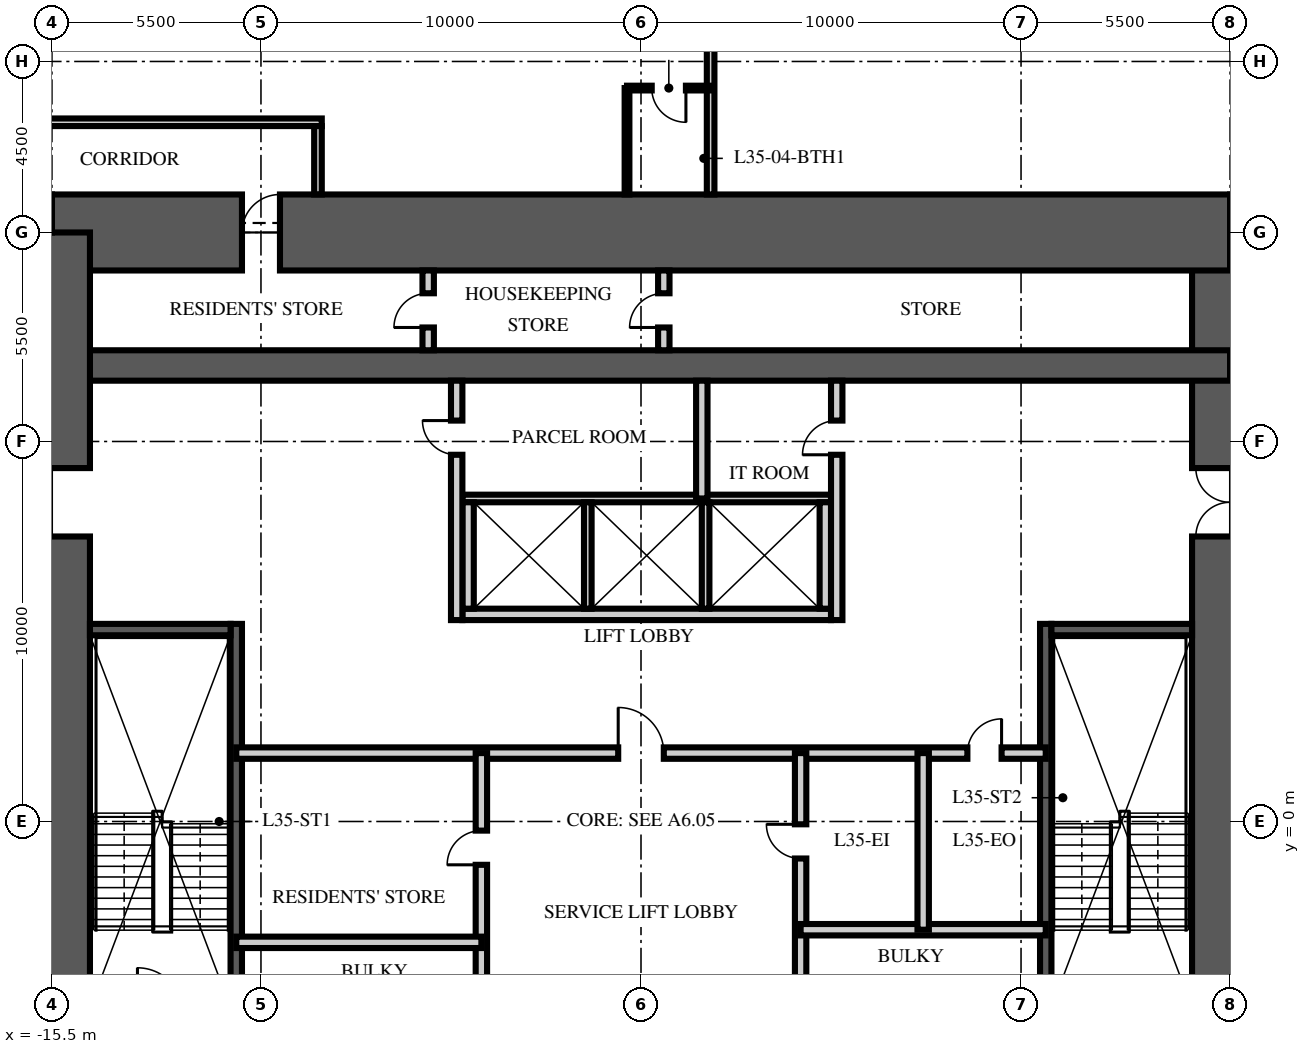
"""IFC4 building model, lengths in metres.
Left out: names, types, materials, properties, quantities, classifications, styles, units other than length and angle.
Written with IfcOpenShell. Run it as: python <this file> out.ifc"""

import sys

from ifc_helpers import new_model, si_unit, direction, frame, frame_2d, origin, place, context, subcontext, project, spatial, rectangle, extrude, element, fill, save


model = new_model("IFC4")
c1 = context("Model", 3, precision=1e-05, world=origin(), true_north=direction((0.0, 1.0)))
c2 = subcontext(c1, "Body", "Model", "MODEL_VIEW")
j1 = project(units=[si_unit("LENGTHUNIT", "METRE"), si_unit("PLANEANGLEUNIT", "RADIAN")], contexts=[c1])
p1 = place(None, origin())
s1 = spatial("IfcSite", under=j1, at=p1, CompositionType="ELEMENT")
p2 = place(p1, origin())
s2 = spatial("IfcBuilding", under=s1, at=p2, CompositionType="ELEMENT")
p3 = place(p2, frame((0.0, 0.0, 141.0)))
s3 = spatial("IfcBuildingStorey", under=s2, at=p3, CompositionType="ELEMENT", Elevation=141.0)
p4 = place(p3, frame((15.5, -15.5, -0.25), z_axis=(0.0, 0.0, 1.0), x_axis=(0.0, 1.0, 0.0)))
e1 = element("IfcWall", 1, at=p4, inside=s3, PredefinedType="SHEAR", context=c2, shape_type="SweptSolid", body=[
    extrude(rectangle(XDim=31.0, YDim=2.0, at=frame_2d((15.5, 0.0))), origin(), (0.0, 0.0, 1.0), 3.75),
])
p5 = place(p4, frame((6.5, 0.0, 0.25)))
e2 = element("IfcOpeningElement", 2, at=p5, cuts=e1, PredefinedType="OPENING", context=c2, shape_type="SweptSolid", body=[
    extrude(rectangle(XDim=1.2, YDim=2.1, at=frame_2d((0.6, 1.05))), frame((0.0, 1.01, 0.0), z_axis=(0.0, -1.0, 0.0), x_axis=(1.0, 0.0, 0.0)), (0.0, 0.0, 1.0), 2.02),
])
p6 = place(p4, frame((23.0, 0.0, 0.25)))
e3 = element("IfcOpeningElement", 3, at=p6, cuts=e1, PredefinedType="OPENING", context=c2, shape_type="SweptSolid", body=[
    extrude(rectangle(XDim=1.8, YDim=2.1, at=frame_2d((0.9, 1.05))), frame((0.0, 1.01, 0.0), z_axis=(0.0, -1.0, 0.0), x_axis=(1.0, 0.0, 0.0)), (0.0, 0.0, 1.0), 2.02),
])
p7 = place(p3, frame((-15.5, 15.5, -0.25), z_axis=(0.0, 0.0, 1.0), x_axis=(1.0, 0.0, 0.0)))
e4 = element("IfcWall", 4, at=p7, inside=s3, PredefinedType="SHEAR", context=c2, shape_type="SweptSolid", body=[
    extrude(rectangle(XDim=31.0, YDim=2.0, at=frame_2d((15.5, 0.0))), origin(), (0.0, 0.0, 1.0), 3.75),
])
p8 = place(p7, frame((5.0, 0.0, 0.25)))
e5 = element("IfcOpeningElement", 5, at=p8, cuts=e4, PredefinedType="OPENING", context=c2, shape_type="SweptSolid", body=[
    extrude(rectangle(XDim=1.0, YDim=2.1, at=frame_2d((0.5, 1.05))), frame((0.0, 1.01, 0.0), z_axis=(0.0, -1.0, 0.0), x_axis=(1.0, 0.0, 0.0)), (0.0, 0.0, 1.0), 2.02),
])
p9 = place(p3, frame((-15.5, 12.0, -0.25), z_axis=(0.0, 0.0, 1.0), x_axis=(1.0, 0.0, 0.0)))
e6 = element("IfcWall", 6, at=p9, inside=s3, PredefinedType="SHEAR", context=c2, shape_type="SweptSolid", body=[
    extrude(rectangle(XDim=31.0, YDim=0.8, at=frame_2d((15.5, 0.0))), origin(), (0.0, 0.0, 1.0), 3.75),
])
p10 = place(p3, frame((-15.5, -15.5, -0.25), z_axis=(0.0, 0.0, 1.0), x_axis=(0.0, 1.0, 0.0)))
e7 = element("IfcWall", 7, at=p10, inside=s3, PredefinedType="SHEAR", context=c2, shape_type="SweptSolid", body=[
    extrude(rectangle(XDim=31.0, YDim=2.0, at=frame_2d((15.5, 0.0))), origin(), (0.0, 0.0, 1.0), 3.75),
])
p11 = place(p10, frame((6.5, 0.0, 0.25)))
e8 = element("IfcOpeningElement", 8, at=p11, cuts=e7, PredefinedType="OPENING", context=c2, shape_type="SweptSolid", body=[
    extrude(rectangle(XDim=1.2, YDim=2.1, at=frame_2d((0.6, 1.05))), frame((0.0, 1.01, 0.0), z_axis=(0.0, -1.0, 0.0), x_axis=(1.0, 0.0, 0.0)), (0.0, 0.0, 1.0), 2.02),
])
p12 = place(p10, frame((23.0, 0.0, 0.25)))
e9 = element("IfcOpeningElement", 9, at=p12, cuts=e7, PredefinedType="OPENING", context=c2, shape_type="SweptSolid", body=[
    extrude(rectangle(XDim=1.8, YDim=2.1, at=frame_2d((0.9, 1.05))), frame((0.0, 1.01, 0.0), z_axis=(0.0, -1.0, 0.0), x_axis=(1.0, 0.0, 0.0)), (0.0, 0.0, 1.0), 2.02),
])
p13 = place(p3, frame((-10.65, -4.9, 0.0), z_axis=(0.0, 0.0, 1.0), x_axis=(0.0, 1.0, 0.0)))
e10 = element("IfcWall", 10, at=p13, inside=s3, PredefinedType="SOLIDWALL", context=c2, shape_type="SweptSolid", body=[
    extrude(rectangle(XDim=10.1, YDim=0.3, at=frame_2d((5.05, 0.0))), origin(), (0.0, 0.0, 1.0), 3.5),
])
p14 = place(p3, frame((-14.5, 5.05, 0.0), z_axis=(0.0, 0.0, 1.0), x_axis=(1.0, 0.0, 0.0)))
e11 = element("IfcWall", 11, at=p14, inside=s3, PredefinedType="SOLIDWALL", context=c2, shape_type="SweptSolid", body=[
    extrude(rectangle(XDim=3.7, YDim=0.3, at=frame_2d((1.85, 0.0))), origin(), (0.0, 0.0, 1.0), 3.5),
])
p15 = place(p3, frame((10.65, -4.9, 0.0), z_axis=(0.0, 0.0, 1.0), x_axis=(0.0, 1.0, 0.0)))
e12 = element("IfcWall", 12, at=p15, inside=s3, PredefinedType="SOLIDWALL", context=c2, shape_type="SweptSolid", body=[
    extrude(rectangle(XDim=10.1, YDim=0.3, at=frame_2d((5.05, 0.0))), origin(), (0.0, 0.0, 1.0), 3.5),
])
p16 = place(p3, frame((14.5, 5.05, 0.0), z_axis=(0.0, 0.0, 1.0), x_axis=(-1.0, 0.0, 0.0)))
e13 = element("IfcWall", 13, at=p16, inside=s3, PredefinedType="SOLIDWALL", context=c2, shape_type="SweptSolid", body=[
    extrude(rectangle(XDim=3.7, YDim=0.3, at=frame_2d((1.85, 0.0))), origin(), (0.0, 0.0, 1.0), 3.5),
])
p17 = place(p3, frame((-4.7, 5.45, 0.0), z_axis=(0.0, 0.0, 1.0), x_axis=(1.0, 0.0, 0.0)))
e14 = element("IfcWall", 14, at=p17, inside=s3, PredefinedType="PARTITIONING", context=c2, shape_type="SweptSolid", body=[
    extrude(rectangle(XDim=9.7, YDim=0.3, at=frame_2d((4.85, 0.0))), origin(), (0.0, 0.0, 1.0), 3.5),
])
p18 = place(p3, frame((-4.7, 8.5, 0.0), z_axis=(0.0, 0.0, 1.0), x_axis=(1.0, 0.0, 0.0)))
e15 = element("IfcWall", 15, at=p18, inside=s3, PredefinedType="PARTITIONING", context=c2, shape_type="SweptSolid", body=[
    extrude(rectangle(XDim=9.7, YDim=0.2, at=frame_2d((4.85, 0.0))), origin(), (0.0, 0.0, 1.0), 3.5),
])
for number, where, z_axis, x_axis in (
    (16, (-4.55, 5.6, 0.0), (0.0, 0.0, 1.0), (0.0, 1.0, 0.0)),
    (17, (4.85, 5.6, 0.0), (0.0, 0.0, 1.0), (0.0, 1.0, 0.0)),
):
    element("IfcWall", number, at=place(p3, frame(where, z_axis=z_axis, x_axis=x_axis)), inside=s3, PredefinedType="PARTITIONING", context=c2, shape_type="SweptSolid", body=[
        extrude(rectangle(XDim=2.8, YDim=0.3, at=frame_2d((1.4, 0.0))), origin(), (0.0, 0.0, 1.0), 3.5),
    ])
for number, where, z_axis, x_axis in (
    (18, (-1.4, 5.6, 0.0), (0.0, 0.0, 1.0), (0.0, 1.0, 0.0)),
    (19, (1.7, 5.6, 0.0), (0.0, 0.0, 1.0), (0.0, 1.0, 0.0)),
):
    element("IfcWall", number, at=place(p3, frame(where, z_axis=z_axis, x_axis=x_axis)), inside=s3, PredefinedType="PARTITIONING", context=c2, shape_type="SweptSolid", body=[
        extrude(rectangle(XDim=2.8, YDim=0.2, at=frame_2d((1.4, 0.0))), origin(), (0.0, 0.0, 1.0), 3.5),
    ])
p19 = place(p3, frame((-10.65, 1.8, 0.0), z_axis=(0.0, 0.0, 1.0), x_axis=(1.0, 0.0, 0.0)))
e20 = element("IfcWall", 20, at=p19, inside=s3, PredefinedType="PARTITIONING", context=c2, shape_type="SweptSolid", body=[
    extrude(rectangle(XDim=21.3, YDim=0.3, at=frame_2d((10.65, 0.0))), origin(), (0.0, 0.0, 1.0), 3.5),
])
p20 = place(p19, frame((10.05, 0.0, 0.0)))
e21 = element("IfcOpeningElement", 21, at=p20, cuts=e20, PredefinedType="OPENING", context=c2, shape_type="SweptSolid", body=[
    extrude(rectangle(XDim=1.2, YDim=2.1, at=frame_2d((0.6, 1.05))), frame((0.0, 0.16, 0.0), z_axis=(0.0, -1.0, 0.0), x_axis=(1.0, 0.0, 0.0)), (0.0, 0.0, 1.0), 0.32),
])
p21 = place(p19, frame((19.238, 0.0, 0.0)))
e22 = element("IfcOpeningElement", 22, at=p21, cuts=e20, PredefinedType="OPENING", context=c2, shape_type="SweptSolid", body=[
    extrude(rectangle(XDim=0.9, YDim=2.1, at=frame_2d((0.45, 1.05))), frame((0.0, 0.16, 0.0), z_axis=(0.0, -1.0, 0.0), x_axis=(1.0, 0.0, 0.0)), (0.0, 0.0, 1.0), 0.32),
])
p22 = place(p3, frame((-4.2, -6.65, 0.0), z_axis=(0.0, 0.0, 1.0), x_axis=(0.0, 1.0, 0.0)))
e23 = element("IfcWall", 23, at=p22, inside=s3, PredefinedType="PARTITIONING", context=c2, shape_type="SweptSolid", body=[
    extrude(rectangle(XDim=8.45, YDim=0.3, at=frame_2d((4.225, 0.0))), origin(), (0.0, 0.0, 1.0), 3.5),
])
p23 = place(p22, frame((1.285, 0.0, 0.0)))
e24 = element("IfcOpeningElement", 24, at=p23, cuts=e23, PredefinedType="OPENING", context=c2, shape_type="SweptSolid", body=[
    extrude(rectangle(XDim=0.9, YDim=2.1, at=frame_2d((0.45, 1.05))), frame((0.0, 0.16, 0.0), z_axis=(0.0, -1.0, 0.0), x_axis=(1.0, 0.0, 0.0)), (0.0, 0.0, 1.0), 0.32),
])
p24 = place(p22, frame((5.51, 0.0, 0.0)))
e25 = element("IfcOpeningElement", 25, at=p24, cuts=e23, PredefinedType="OPENING", context=c2, shape_type="SweptSolid", body=[
    extrude(rectangle(XDim=0.9, YDim=2.1, at=frame_2d((0.45, 1.05))), frame((0.0, 0.16, 0.0), z_axis=(0.0, -1.0, 0.0), x_axis=(1.0, 0.0, 0.0)), (0.0, 0.0, 1.0), 0.32),
])
p25 = place(p3, frame((4.2, -6.65, 0.0), z_axis=(0.0, 0.0, 1.0), x_axis=(0.0, 1.0, 0.0)))
e26 = element("IfcWall", 26, at=p25, inside=s3, PredefinedType="PARTITIONING", context=c2, shape_type="SweptSolid", body=[
    extrude(rectangle(XDim=8.45, YDim=0.3, at=frame_2d((4.225, 0.0))), origin(), (0.0, 0.0, 1.0), 3.5),
])
p26 = place(p25, frame((1.451, 0.0, 0.0)))
e27 = element("IfcOpeningElement", 27, at=p26, cuts=e26, PredefinedType="OPENING", context=c2, shape_type="SweptSolid", body=[
    extrude(rectangle(XDim=0.9, YDim=2.1, at=frame_2d((0.45, 1.05))), frame((0.0, 0.16, 0.0), z_axis=(0.0, -1.0, 0.0), x_axis=(1.0, 0.0, 0.0)), (0.0, 0.0, 1.0), 0.32),
])
p27 = place(p25, frame((5.676, 0.0, 0.0)))
e28 = element("IfcOpeningElement", 28, at=p27, cuts=e26, PredefinedType="OPENING", context=c2, shape_type="SweptSolid", body=[
    extrude(rectangle(XDim=0.9, YDim=2.1, at=frame_2d((0.45, 1.05))), frame((0.0, 0.16, 0.0), z_axis=(0.0, -1.0, 0.0), x_axis=(1.0, 0.0, 0.0)), (0.0, 0.0, 1.0), 0.32),
])
for number, where, z_axis, x_axis in (
    (29, (-10.65, -3.18, 0.0), (0.0, 0.0, 1.0), (1.0, 0.0, 0.0)),
    (30, (10.65, -2.848, 0.0), (0.0, 0.0, 1.0), (-1.0, 0.0, 0.0)),
):
    element("IfcWall", number, at=place(p3, frame(where, z_axis=z_axis, x_axis=x_axis)), inside=s3, PredefinedType="PARTITIONING", context=c2, shape_type="SweptSolid", body=[
        extrude(rectangle(XDim=6.45, YDim=0.3, at=frame_2d((3.225, 0.0))), origin(), (0.0, 0.0, 1.0), 3.5),
    ])
p28 = place(p3, frame((7.425, -2.848, 0.0), z_axis=(0.0, 0.0, 1.0), x_axis=(0.0, 1.0, 0.0)))
e31 = element("IfcWall", 31, at=p28, inside=s3, PredefinedType="PARTITIONING", context=c2, shape_type="SweptSolid", body=[
    extrude(rectangle(XDim=4.648, YDim=0.3, at=frame_2d((2.324, 0.0))), origin(), (0.0, 0.0, 1.0), 3.5),
])
p29 = place(p3, frame((-4.85, 5.3, 0.0), z_axis=(0.0, 0.0, 1.0), x_axis=(0.0, 1.0, 0.0)))
e32 = element("IfcWall", 32, at=p29, inside=s3, PredefinedType="PARTITIONING", context=c2, shape_type="SweptSolid", body=[
    extrude(rectangle(XDim=6.3, YDim=0.3, at=frame_2d((3.15, 0.0))), origin(), (0.0, 0.0, 1.0), 3.5),
])
p30 = place(p29, frame((4.35, 0.0, 0.0)))
e33 = element("IfcOpeningElement", 33, at=p30, cuts=e32, PredefinedType="OPENING", context=c2, shape_type="SweptSolid", body=[
    extrude(rectangle(XDim=0.9, YDim=2.1, at=frame_2d((0.45, 1.05))), frame((0.0, 0.16, 0.0), z_axis=(0.0, -1.0, 0.0), x_axis=(1.0, 0.0, 0.0)), (0.0, 0.0, 1.0), 0.32),
])
p31 = place(p3, frame((5.15, 5.3, 0.0), z_axis=(0.0, 0.0, 1.0), x_axis=(0.0, 1.0, 0.0)))
e34 = element("IfcWall", 34, at=p31, inside=s3, PredefinedType="PARTITIONING", context=c2, shape_type="SweptSolid", body=[
    extrude(rectangle(XDim=6.3, YDim=0.3, at=frame_2d((3.15, 0.0))), origin(), (0.0, 0.0, 1.0), 3.5),
])
p32 = place(p31, frame((4.35, 0.0, 0.0)))
e35 = element("IfcOpeningElement", 35, at=p32, cuts=e34, PredefinedType="OPENING", context=c2, shape_type="SweptSolid", body=[
    extrude(rectangle(XDim=0.9, YDim=2.1, at=frame_2d((0.45, 1.05))), frame((0.0, 0.16, 0.0), z_axis=(0.0, -1.0, 0.0), x_axis=(1.0, 0.0, 0.0)), (0.0, 0.0, 1.0), 0.32),
])
p33 = place(p3, frame((1.6, 8.5, 0.0), z_axis=(0.0, 0.0, 1.0), x_axis=(0.0, 1.0, 0.0)))
e36 = element("IfcWall", 36, at=p33, inside=s3, PredefinedType="PARTITIONING", context=c2, shape_type="SweptSolid", body=[
    extrude(rectangle(XDim=3.1, YDim=0.3, at=frame_2d((1.55, 0.0))), origin(), (0.0, 0.0, 1.0), 3.5),
])
p34 = place(p3, frame((-5.6, 12.4, 0.0), z_axis=(0.0, 0.0, 1.0), x_axis=(0.0, 1.0, 0.0)))
e37 = element("IfcWall", 37, at=p34, inside=s3, PredefinedType="PARTITIONING", context=c2, shape_type="SweptSolid", body=[
    extrude(rectangle(XDim=2.1, YDim=0.3, at=frame_2d((1.05, 0.0))), origin(), (0.0, 0.0, 1.0), 3.5),
])
p35 = place(p34, frame((0.6, 0.0, 0.0)))
e38 = element("IfcOpeningElement", 38, at=p35, cuts=e37, PredefinedType="OPENING", context=c2, shape_type="SweptSolid", body=[
    extrude(rectangle(XDim=0.9, YDim=2.1, at=frame_2d((0.45, 1.05))), frame((0.0, 0.16, 0.0), z_axis=(0.0, -1.0, 0.0), x_axis=(1.0, 0.0, 0.0)), (0.0, 0.0, 1.0), 0.32),
])
p36 = place(p3, frame((0.6, 12.4, 0.0), z_axis=(0.0, 0.0, 1.0), x_axis=(0.0, 1.0, 0.0)))
e39 = element("IfcWall", 39, at=p36, inside=s3, PredefinedType="PARTITIONING", context=c2, shape_type="SweptSolid", body=[
    extrude(rectangle(XDim=2.1, YDim=0.3, at=frame_2d((1.05, 0.0))), origin(), (0.0, 0.0, 1.0), 3.5),
])
p37 = place(p36, frame((0.6, 0.0, 0.0)))
e40 = element("IfcOpeningElement", 40, at=p37, cuts=e39, PredefinedType="OPENING", context=c2, shape_type="SweptSolid", body=[
    extrude(rectangle(XDim=0.9, YDim=2.1, at=frame_2d((0.45, 1.05))), frame((0.0, 0.16, 0.0), z_axis=(0.0, -1.0, 0.0), x_axis=(1.0, 0.0, 0.0)), (0.0, 0.0, 1.0), 0.32),
])
p38 = place(p3, frame((-18.5, 18.4, 0.0), z_axis=(0.0, 0.0, 1.0), x_axis=(1.0, 0.0, 0.0)))
e41 = element("IfcWall", 41, at=p38, inside=s3, PredefinedType="PARTITIONING", context=c2, shape_type="SweptSolid", body=[
    extrude(rectangle(XDim=10.1, YDim=0.2, at=frame_2d((5.05, 0.0))), origin(), (0.0, 0.0, 1.0), 2.3),
])
p39 = place(p3, frame((-8.5, 18.3, 0.0), z_axis=(0.0, 0.0, 1.0), x_axis=(0.0, -1.0, 0.0)))
e42 = element("IfcWall", 42, at=p39, inside=s3, PredefinedType="PARTITIONING", context=c2, shape_type="SweptSolid", body=[
    extrude(rectangle(XDim=1.8, YDim=0.2, at=frame_2d((0.9, 0.0))), origin(), (0.0, 0.0, 1.0), 3.5),
])
p40 = place(p3, frame((1.832, 16.5, 0.0), z_axis=(0.0, 0.0, 1.0), x_axis=(0.0, 1.0, 0.0)))
e43 = element("IfcWall", 43, at=p40, inside=s3, PredefinedType="PARTITIONING", context=c2, shape_type="SweptSolid", body=[
    extrude(rectangle(XDim=12.15, YDim=0.2, at=frame_2d((6.075, 0.0))), origin(), (0.0, 0.0, 1.0), 2.81),
])
p41 = place(p3, frame((1.832, 19.3, 0.0), z_axis=(0.0, 0.0, 1.0), x_axis=(-1.0, 0.0, 0.0)))
e44 = element("IfcWall", 44, at=p41, inside=s3, PredefinedType="PARTITIONING", context=c2, shape_type="SweptSolid", body=[
    extrude(rectangle(XDim=2.2, YDim=0.125, at=frame_2d((1.1, 0.0))), origin(), (0.0, 0.0, 1.0), 2.7),
])
p42 = place(p41, frame((0.65, 0.0, 0.0)))
e45 = element("IfcOpeningElement", 45, at=p42, cuts=e44, PredefinedType="OPENING", context=c2, shape_type="SweptSolid", body=[
    extrude(rectangle(XDim=0.9, YDim=2.1, at=frame_2d((0.45, 1.05))), frame((0.0, 0.073, 0.0), z_axis=(0.0, -1.0, 0.0), x_axis=(1.0, 0.0, 0.0)), (0.0, 0.0, 1.0), 0.145),
])
p43 = place(p3, frame((-0.368, 16.5, 0.0), z_axis=(0.0, 0.0, 1.0), x_axis=(0.0, 1.0, 0.0)))
e46 = element("IfcWall", 46, at=p43, inside=s3, PredefinedType="PARTITIONING", context=c2, shape_type="SweptSolid", body=[
    extrude(rectangle(XDim=2.8, YDim=0.125, at=frame_2d((1.4, 0.0))), origin(), (0.0, 0.0, 1.0), 3.5),
])
p44 = place(p12, origin())
e47 = element("IfcDoor", 47, at=p44, inside=s3, OperationType="DOUBLE_DOOR_SINGLE_SWING", PredefinedType="DOOR", context=c2, shape_type="SweptSolid", body=[
    extrude(rectangle(XDim=1.8, YDim=2.1, at=frame_2d((0.9, 1.05))), frame((0.0, 0.025, 0.0), z_axis=(0.0, -1.0, 0.0), x_axis=(1.0, 0.0, 0.0)), (0.0, 0.0, 1.0), 0.05),
])
fill(e9, e47)
p45 = place(p6, origin())
e48 = element("IfcDoor", 48, at=p45, inside=s3, OperationType="DOUBLE_DOOR_SINGLE_SWING", PredefinedType="DOOR", context=c2, shape_type="SweptSolid", body=[
    extrude(rectangle(XDim=1.8, YDim=2.1, at=frame_2d((0.9, 1.05))), frame((0.0, 0.025, 0.0), z_axis=(0.0, -1.0, 0.0), x_axis=(1.0, 0.0, 0.0)), (0.0, 0.0, 1.0), 0.05),
])
fill(e3, e48)
p46 = place(p20, origin())
e49 = element("IfcDoor", 49, at=p46, inside=s3, OperationType="SINGLE_SWING_LEFT", PredefinedType="DOOR", context=c2, shape_type="SweptSolid", body=[
    extrude(rectangle(XDim=1.2, YDim=2.1, at=frame_2d((0.6, 1.05))), frame((0.0, 0.025, 0.0), z_axis=(0.0, -1.0, 0.0), x_axis=(1.0, 0.0, 0.0)), (0.0, 0.0, 1.0), 0.05),
])
fill(e21, e49)
p47 = place(p24, origin())
e50 = element("IfcDoor", 50, at=p47, inside=s3, OperationType="SINGLE_SWING_LEFT", PredefinedType="DOOR", context=c2, shape_type="SweptSolid", body=[
    extrude(rectangle(XDim=0.9, YDim=2.1, at=frame_2d((0.45, 1.05))), frame((0.0, 0.025, 0.0), z_axis=(0.0, -1.0, 0.0), x_axis=(1.0, 0.0, 0.0)), (0.0, 0.0, 1.0), 0.05),
])
fill(e25, e50)
p48 = place(p27, origin())
e51 = element("IfcDoor", 51, at=p48, inside=s3, OperationType="SINGLE_SWING_RIGHT", PredefinedType="DOOR", context=c2, shape_type="SweptSolid", body=[
    extrude(rectangle(XDim=0.9, YDim=2.1, at=frame_2d((0.45, 1.05))), frame((0.0, 0.025, 0.0), z_axis=(0.0, -1.0, 0.0), x_axis=(1.0, 0.0, 0.0)), (0.0, 0.0, 1.0), 0.05),
])
fill(e28, e51)
p49 = place(p21, origin())
e52 = element("IfcDoor", 52, at=p49, inside=s3, OperationType="SINGLE_SWING_RIGHT", PredefinedType="DOOR", context=c2, shape_type="SweptSolid", body=[
    extrude(rectangle(XDim=0.9, YDim=2.1, at=frame_2d((0.45, 1.05))), frame((0.0, 0.025, 0.0), z_axis=(0.0, -1.0, 0.0), x_axis=(1.0, 0.0, 0.0)), (0.0, 0.0, 1.0), 0.05),
])
fill(e22, e52)
p50 = place(p30, origin())
e53 = element("IfcDoor", 53, at=p50, inside=s3, OperationType="SINGLE_SWING_RIGHT", PredefinedType="DOOR", context=c2, shape_type="SweptSolid", body=[
    extrude(rectangle(XDim=0.9, YDim=2.1, at=frame_2d((0.45, 1.05))), frame((0.0, 0.025, 0.0), z_axis=(0.0, -1.0, 0.0), x_axis=(1.0, 0.0, 0.0)), (0.0, 0.0, 1.0), 0.05),
])
fill(e33, e53)
p51 = place(p32, origin())
e54 = element("IfcDoor", 54, at=p51, inside=s3, OperationType="SINGLE_SWING_LEFT", PredefinedType="DOOR", context=c2, shape_type="SweptSolid", body=[
    extrude(rectangle(XDim=0.9, YDim=2.1, at=frame_2d((0.45, 1.05))), frame((0.0, 0.025, 0.0), z_axis=(0.0, -1.0, 0.0), x_axis=(1.0, 0.0, 0.0)), (0.0, 0.0, 1.0), 0.05),
])
fill(e35, e54)
p52 = place(p35, origin())
e55 = element("IfcDoor", 55, at=p52, inside=s3, OperationType="SINGLE_SWING_LEFT", PredefinedType="DOOR", context=c2, shape_type="SweptSolid", body=[
    extrude(rectangle(XDim=0.9, YDim=2.1, at=frame_2d((0.45, 1.05))), frame((0.0, 0.025, 0.0), z_axis=(0.0, -1.0, 0.0), x_axis=(1.0, 0.0, 0.0)), (0.0, 0.0, 1.0), 0.05),
])
fill(e38, e55)
p53 = place(p37, origin())
e56 = element("IfcDoor", 56, at=p53, inside=s3, OperationType="SINGLE_SWING_LEFT", PredefinedType="DOOR", context=c2, shape_type="SweptSolid", body=[
    extrude(rectangle(XDim=0.9, YDim=2.1, at=frame_2d((0.45, 1.05))), frame((0.0, 0.025, 0.0), z_axis=(0.0, -1.0, 0.0), x_axis=(1.0, 0.0, 0.0)), (0.0, 0.0, 1.0), 0.05),
])
fill(e40, e56)
p54 = place(p8, origin())
e57 = element("IfcDoor", 57, at=p54, inside=s3, OperationType="SINGLE_SWING_RIGHT", PredefinedType="DOOR", context=c2, shape_type="SweptSolid", body=[
    extrude(rectangle(XDim=1.0, YDim=2.1, at=frame_2d((0.5, 1.05))), frame((0.0, 0.025, 0.0), z_axis=(0.0, -1.0, 0.0), x_axis=(1.0, 0.0, 0.0)), (0.0, 0.0, 1.0), 0.05),
])
fill(e5, e57)
p55 = place(p42, origin())
e58 = element("IfcDoor", 58, at=p55, inside=s3, OperationType="SINGLE_SWING_LEFT", PredefinedType="DOOR", context=c2, shape_type="SweptSolid", body=[
    extrude(rectangle(XDim=0.9, YDim=2.1, at=frame_2d((0.45, 1.05))), frame((0.0, 0.025, 0.0), z_axis=(0.0, -1.0, 0.0), x_axis=(1.0, 0.0, 0.0)), (0.0, 0.0, 1.0), 0.05),
])
fill(e45, e58)
save(model, sys.argv[1])
